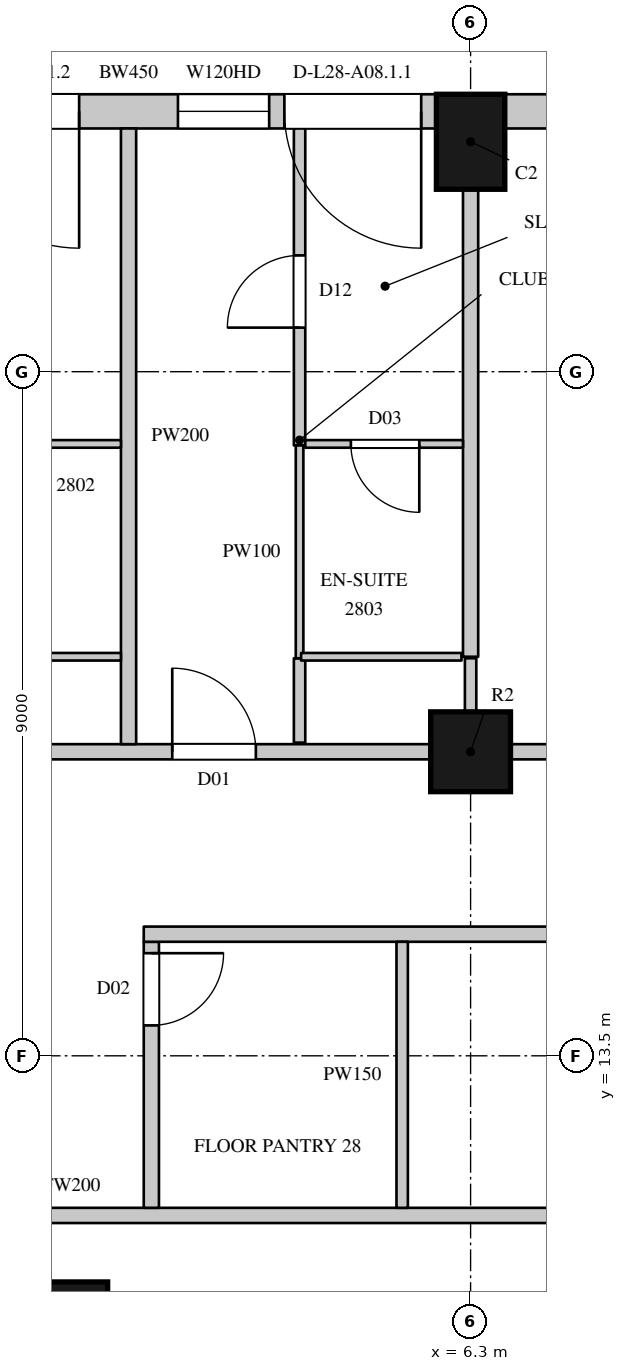
"""IFC4 building model, lengths in metres.
Left out: names, types, materials, properties, quantities, classifications, styles, units other than length and angle.
Written with IfcOpenShell. Run it as: python <this file> out.ifc"""

import sys

from ifc_helpers import new_model, si_unit, direction, frame, frame_2d, origin, origin_2d, place, context, subcontext, project, spatial, rectangle, circle, extrude, element, fill, save


model = new_model("IFC4")
c1 = context("Model", 3, precision=1e-05, world=origin(), true_north=direction((0.0, 1.0)))
c2 = subcontext(c1, "Body", "Model", "MODEL_VIEW")
j1 = project(units=[si_unit("LENGTHUNIT", "METRE"), si_unit("PLANEANGLEUNIT", "RADIAN")], contexts=[c1])
p1 = place(None, origin())
s1 = spatial("IfcSite", under=j1, at=p1, CompositionType="ELEMENT")
p2 = place(p1, origin())
s2 = spatial("IfcBuilding", under=s1, at=p2, CompositionType="ELEMENT")
p3 = place(p2, frame((0.0, 0.0, 131.1)))
s3 = spatial("IfcBuildingStorey", under=s2, at=p3, CompositionType="ELEMENT", Elevation=131.1)
p4 = place(p3, frame((6.3, 25.525, 0.0), z_axis=(0.0, 0.0, 1.0), x_axis=(-1.0, 0.0, 0.0)))
e1 = element("IfcColumn", 1, at=p4, inside=s3, PredefinedType="COLUMN", context=c2, shape_type="SweptSolid", body=[
    extrude(rectangle(XDim=0.9, YDim=1.25, at=origin_2d()), origin(), (0.0, 0.0, 1.0), 3.6),
])
for number, where, z_axis, x_axis in (
    (2, (6.3, 17.5, 0.0), (0.0, 0.0, 1.0), (1.0, 0.0, 0.0)),
    (3, (1.0, 10.0, 0.0), (0.0, 0.0, 1.0), (1.0, 0.0, 0.0)),
):
    element("IfcColumn", number, at=place(p3, frame(where, z_axis=z_axis, x_axis=x_axis)), inside=s3, PredefinedType="COLUMN", context=c2, shape_type="SweptSolid", body=[
        extrude(circle(Radius=0.525, at=origin_2d()), origin(), (0.0, 0.0, 1.0), 3.6),
    ])
p5 = place(p3, frame((11.989, 25.925, 0.0), z_axis=(0.0, 0.0, 1.0), x_axis=(-1.0, 0.0, 0.0)))
e4 = element("IfcWall", 4, at=p5, inside=s3, PredefinedType="SOLIDWALL", context=c2, shape_type="SweptSolid", body=[
    extrude(rectangle(XDim=5.239, YDim=0.45, at=frame_2d((2.619, 0.0))), origin(), (0.0, 0.0, 1.0), 3.3),
])
p6 = place(p5, frame((1.77, 0.0, 1.05)))
e5 = element("IfcOpeningElement", 5, at=p6, cuts=e4, PredefinedType="OPENING", context=c2, shape_type="SweptSolid", body=[
    extrude(rectangle(XDim=2.1, YDim=2.0, at=frame_2d((1.05, 1.0))), frame((0.0, 0.235, 0.0), z_axis=(0.0, -1.0, 0.0), x_axis=(1.0, 0.0, 0.0)), (0.0, 0.0, 1.0), 0.47),
])
p7 = place(p3, frame((5.85, 25.925, 0.0), z_axis=(0.0, 0.0, 1.0), x_axis=(-1.0, 0.0, 0.0)))
e6 = element("IfcWall", 6, at=p7, inside=s3, PredefinedType="SOLIDWALL", context=c2, shape_type="SweptSolid", body=[
    extrude(rectangle(XDim=8.1, YDim=0.45, at=frame_2d((4.05, 0.0))), origin(), (0.0, 0.0, 1.0), 3.3),
])
p8 = place(p7, frame((0.2, 0.0, 0.0)))
e7 = element("IfcOpeningElement", 7, at=p8, cuts=e6, PredefinedType="OPENING", context=c2, shape_type="SweptSolid", body=[
    extrude(rectangle(XDim=1.8, YDim=2.4, at=frame_2d((0.9, 1.2))), frame((0.0, 0.235, 0.0), z_axis=(0.0, -1.0, 0.0), x_axis=(1.0, 0.0, 0.0)), (0.0, 0.0, 1.0), 0.47),
])
p9 = place(p7, frame((2.2, 0.0, 1.05)))
e8 = element("IfcOpeningElement", 8, at=p9, cuts=e6, PredefinedType="OPENING", context=c2, shape_type="SweptSolid", body=[
    extrude(rectangle(XDim=1.2, YDim=2.0, at=frame_2d((0.6, 1.0))), frame((0.0, 0.235, 0.0), z_axis=(0.0, -1.0, 0.0), x_axis=(1.0, 0.0, 0.0)), (0.0, 0.0, 1.0), 0.47),
])
p10 = place(p7, frame((4.7, 0.0, 0.0)))
e9 = element("IfcOpeningElement", 9, at=p10, cuts=e6, PredefinedType="OPENING", context=c2, shape_type="SweptSolid", body=[
    extrude(rectangle(XDim=1.8, YDim=2.4, at=frame_2d((0.9, 1.2))), frame((0.0, 0.235, 0.0), z_axis=(0.0, -1.0, 0.0), x_axis=(1.0, 0.0, 0.0)), (0.0, 0.0, 1.0), 0.47),
])
p11 = place(p7, frame((6.7, 0.0, 1.05)))
e10 = element("IfcOpeningElement", 10, at=p11, cuts=e6, PredefinedType="OPENING", context=c2, shape_type="SweptSolid", body=[
    extrude(rectangle(XDim=1.2, YDim=2.0, at=frame_2d((0.6, 1.0))), frame((0.0, 0.235, 0.0), z_axis=(0.0, -1.0, 0.0), x_axis=(1.0, 0.0, 0.0)), (0.0, 0.0, 1.0), 0.47),
])
p12 = place(p3, frame((-2.175, 17.5, 0.0), z_axis=(0.0, 0.0, 1.0), x_axis=(1.0, 0.0, 0.0)))
e11 = element("IfcWall", 11, at=p12, inside=s3, PredefinedType="PARTITIONING", context=c2, shape_type="SweptSolid", body=[
    extrude(rectangle(XDim=7.95, YDim=0.2, at=frame_2d((3.975, 0.0))), origin(), (0.0, 0.0, 1.0), 2.75),
])
p13 = place(p12, frame((4.55, 0.0, 0.0)))
e12 = element("IfcOpeningElement", 12, at=p13, cuts=e11, PredefinedType="OPENING", context=c2, shape_type="SweptSolid", body=[
    extrude(rectangle(XDim=1.1, YDim=2.4, at=frame_2d((0.55, 1.2))), frame((0.0, 0.11, 0.0), z_axis=(0.0, -1.0, 0.0), x_axis=(1.0, 0.0, 0.0)), (0.0, 0.0, 1.0), 0.22),
])
p14 = place(p3, frame((6.825, 17.5, 0.0), z_axis=(0.0, 0.0, 1.0), x_axis=(1.0, 0.0, 0.0)))
e13 = element("IfcWall", 13, at=p14, inside=s3, PredefinedType="PARTITIONING", context=c2, shape_type="SweptSolid", body=[
    extrude(rectangle(XDim=7.95, YDim=0.2, at=frame_2d((3.975, 0.0))), origin(), (0.0, 0.0, 1.0), 2.75),
])
p15 = place(p14, frame((1.55, 0.0, 0.0)))
e14 = element("IfcOpeningElement", 14, at=p15, cuts=e13, PredefinedType="OPENING", context=c2, shape_type="SweptSolid", body=[
    extrude(rectangle(XDim=1.1, YDim=2.4, at=frame_2d((0.55, 1.2))), frame((0.0, 0.11, 0.0), z_axis=(0.0, -1.0, 0.0), x_axis=(1.0, 0.0, 0.0)), (0.0, 0.0, 1.0), 0.22),
])
p16 = place(p3, frame((-8.3, 11.4, 0.0), z_axis=(0.0, 0.0, 1.0), x_axis=(1.0, 0.0, 0.0)))
e15 = element("IfcWall", 15, at=p16, inside=s3, PredefinedType="PARTITIONING", context=c2, shape_type="SweptSolid", body=[
    extrude(rectangle(XDim=18.7, YDim=0.2, at=frame_2d((9.35, 0.0))), origin(), (0.0, 0.0, 1.0), 3.3),
])
p17 = place(p16, frame((6.9, 0.0, 0.0)))
e16 = element("IfcOpeningElement", 16, at=p17, cuts=e15, PredefinedType="OPENING", context=c2, shape_type="SweptSolid", body=[
    extrude(rectangle(XDim=1.5, YDim=2.2, at=frame_2d((0.75, 1.1))), frame((0.0, 0.11, 0.0), z_axis=(0.0, -1.0, 0.0), x_axis=(1.0, 0.0, 0.0)), (0.0, 0.0, 1.0), 0.22),
])
p18 = place(p3, frame((2.1, 11.5, 0.0), z_axis=(0.0, 0.0, 1.0), x_axis=(0.0, 1.0, 0.0)))
e17 = element("IfcWall", 17, at=p18, inside=s3, PredefinedType="PARTITIONING", context=c2, shape_type="SweptSolid", body=[
    extrude(rectangle(XDim=3.5, YDim=0.2, at=frame_2d((1.75, 0.0))), origin(), (0.0, 0.0, 1.0), 3.3),
])
p19 = place(p18, frame((2.4, 0.0, 0.0)))
e18 = element("IfcOpeningElement", 18, at=p19, cuts=e17, PredefinedType="OPENING", context=c2, shape_type="SweptSolid", body=[
    extrude(rectangle(XDim=0.95, YDim=2.2, at=frame_2d((0.475, 1.1))), frame((0.0, 0.11, 0.0), z_axis=(0.0, -1.0, 0.0), x_axis=(1.0, 0.0, 0.0)), (0.0, 0.0, 1.0), 0.22),
])
p20 = place(p3, frame((2.0, 15.1, 0.0), z_axis=(0.0, 0.0, 1.0), x_axis=(1.0, 0.0, 0.0)))
e19 = element("IfcWall", 19, at=p20, inside=s3, PredefinedType="PARTITIONING", context=c2, shape_type="SweptSolid", body=[
    extrude(rectangle(XDim=11.8, YDim=0.2, at=frame_2d((5.9, 0.0))), origin(), (0.0, 0.0, 1.0), 3.3),
])
p21 = place(p20, frame((7.1, 0.0, 0.0)))
e20 = element("IfcOpeningElement", 20, at=p21, cuts=e19, PredefinedType="OPENING", context=c2, shape_type="SweptSolid", body=[
    extrude(rectangle(XDim=0.9, YDim=2.2, at=frame_2d((0.45, 1.1))), frame((0.0, 0.11, 0.0), z_axis=(0.0, -1.0, 0.0), x_axis=(1.0, 0.0, 0.0)), (0.0, 0.0, 1.0), 0.22),
])
p22 = place(p3, frame((4.05, 17.62, 0.0), z_axis=(0.0, 0.0, 1.0), x_axis=(0.0, 1.0, 0.0)))
e21 = element("IfcWall", 21, at=p22, inside=s3, PredefinedType="PARTITIONING", context=c2, shape_type="SweptSolid", body=[
    extrude(rectangle(XDim=1.11, YDim=0.15, at=frame_2d((0.555, 0.0))), origin(), (0.0, 0.0, 1.0), 3.3),
])
p23 = place(p3, frame((4.05, 21.53, 0.0), z_axis=(0.0, 0.0, 1.0), x_axis=(0.0, 1.0, 0.0)))
e22 = element("IfcWall", 22, at=p23, inside=s3, PredefinedType="PARTITIONING", context=c2, shape_type="SweptSolid", body=[
    extrude(rectangle(XDim=4.17, YDim=0.15, at=frame_2d((2.085, 0.0))), origin(), (0.0, 0.0, 1.0), 3.3),
])
p24 = place(p23, frame((1.55, 0.0, 0.0)))
e23 = element("IfcOpeningElement", 23, at=p24, cuts=e22, PredefinedType="OPENING", context=c2, shape_type="SweptSolid", body=[
    extrude(rectangle(XDim=0.95, YDim=2.2, at=frame_2d((0.475, 1.1))), frame((0.0, 0.085, 0.0), z_axis=(0.0, -1.0, 0.0), x_axis=(1.0, 0.0, 0.0)), (0.0, 0.0, 1.0), 0.17),
])
p25 = place(p3, frame((5.4, 11.5, 0.0), z_axis=(0.0, 0.0, 1.0), x_axis=(0.0, 1.0, 0.0)))
e24 = element("IfcWall", 24, at=p25, inside=s3, PredefinedType="PARTITIONING", context=c2, shape_type="SweptSolid", body=[
    extrude(rectangle(XDim=3.5, YDim=0.15, at=frame_2d((1.75, 0.0))), origin(), (0.0, 0.0, 1.0), 3.3),
])
p26 = place(p3, frame((6.3, 18.025, 0.0), z_axis=(0.0, 0.0, 1.0), x_axis=(0.0, 1.0, 0.0)))
e25 = element("IfcWall", 25, at=p26, inside=s3, PredefinedType="PARTITIONING", context=c2, shape_type="SweptSolid", body=[
    extrude(rectangle(XDim=0.705, YDim=0.15, at=frame_2d((0.353, 0.0))), origin(), (0.0, 0.0, 1.0), 2.75),
])
p27 = place(p3, frame((1.8, 17.6, 0.0), z_axis=(0.0, 0.0, 1.0), x_axis=(0.0, 1.0, 0.0)))
e26 = element("IfcWall", 26, at=p27, inside=s3, PredefinedType="PARTITIONING", context=c2, shape_type="SweptSolid", body=[
    extrude(rectangle(XDim=8.1, YDim=0.2, at=frame_2d((4.05, 0.0))), origin(), (0.0, 0.0, 1.0), 2.65),
])
p28 = place(p3, frame((6.3, 18.75, 0.0), z_axis=(0.0, 0.0, 1.0), x_axis=(0.0, 1.0, 0.0)))
e27 = element("IfcWall", 27, at=p28, inside=s3, PredefinedType="PARTITIONING", context=c2, shape_type="SweptSolid", body=[
    extrude(rectangle(XDim=6.15, YDim=0.2, at=frame_2d((3.075, 0.0))), origin(), (0.0, 0.0, 1.0), 2.75),
])
for number, where, z_axis, x_axis in (
    (28, (-0.846, 18.75, 0.0), (0.0, 0.0, 1.0), (1.0, 0.0, 0.0)),
    (29, (-0.846, 21.55, 0.0), (0.0, 0.0, 1.0), (1.0, 0.0, 0.0)),
):
    element("IfcWall", number, at=place(p3, frame(where, z_axis=z_axis, x_axis=x_axis)), inside=s3, PredefinedType="PARTITIONING", context=c2, shape_type="SweptSolid", body=[
        extrude(rectangle(XDim=2.546, YDim=0.1, at=frame_2d((1.273, 0.0))), origin(), (0.0, 0.0, 1.0), 3.3),
    ])
p29 = place(p3, frame((4.05, 18.73, 0.0), z_axis=(0.0, 0.0, 1.0), x_axis=(0.0, 1.0, 0.0)))
e30 = element("IfcWall", 30, at=p29, inside=s3, PredefinedType="PARTITIONING", context=c2, shape_type="SweptSolid", body=[
    extrude(rectangle(XDim=2.8, YDim=0.1, at=frame_2d((1.4, 0.0))), origin(), (0.0, 0.0, 1.0), 3.3),
])
p30 = place(p3, frame((4.125, 21.55, 0.0), z_axis=(0.0, 0.0, 1.0), x_axis=(1.0, 0.0, 0.0)))
e31 = element("IfcWall", 31, at=p30, inside=s3, PredefinedType="PARTITIONING", context=c2, shape_type="SweptSolid", body=[
    extrude(rectangle(XDim=2.075, YDim=0.1, at=frame_2d((1.038, 0.0))), origin(), (0.0, 0.0, 1.0), 3.3),
])
p31 = place(p30, frame((0.6, 0.0, 0.0)))
e32 = element("IfcOpeningElement", 32, at=p31, cuts=e31, PredefinedType="OPENING", context=c2, shape_type="SweptSolid", body=[
    extrude(rectangle(XDim=0.9, YDim=2.2, at=frame_2d((0.45, 1.1))), frame((0.0, 0.06, 0.0), z_axis=(0.0, -1.0, 0.0), x_axis=(1.0, 0.0, 0.0)), (0.0, 0.0, 1.0), 0.12),
])
p32 = place(p3, frame((4.07, 18.75, 0.0), z_axis=(0.0, 0.0, 1.0), x_axis=(1.0, 0.0, 0.0)))
e33 = element("IfcWall", 33, at=p32, inside=s3, PredefinedType="PARTITIONING", context=c2, shape_type="SweptSolid", body=[
    extrude(rectangle(XDim=2.11, YDim=0.1, at=frame_2d((1.055, 0.0))), origin(), (0.0, 0.0, 1.0), 3.3),
])
p33 = place(p8, origin())
e34 = element("IfcDoor", 34, at=p33, inside=s3, OperationType="SLIDING_TO_LEFT", PredefinedType="DOOR", context=c2, shape_type="SweptSolid", body=[
    extrude(rectangle(XDim=1.8, YDim=2.4, at=frame_2d((0.9, 1.2))), frame((0.0, 0.13, 0.0), z_axis=(0.0, -1.0, 0.0), x_axis=(1.0, 0.0, 0.0)), (0.0, 0.0, 1.0), 0.05),
])
fill(e7, e34)
p34 = place(p9, origin())
e35 = element("IfcWindow", 35, at=p34, inside=s3, PartitioningType="SINGLE_PANEL", PredefinedType="WINDOW", context=c2, shape_type="SweptSolid", body=[
    extrude(rectangle(XDim=1.2, YDim=2.0, at=frame_2d((0.6, 1.0))), frame((0.0, 0.135, 0.0), z_axis=(0.0, -1.0, 0.0), x_axis=(1.0, 0.0, 0.0)), (0.0, 0.0, 1.0), 0.06),
])
fill(e8, e35)
p35 = place(p10, origin())
e36 = element("IfcDoor", 36, at=p35, inside=s3, OperationType="SLIDING_TO_LEFT", PredefinedType="DOOR", context=c2, shape_type="SweptSolid", body=[
    extrude(rectangle(XDim=1.8, YDim=2.4, at=frame_2d((0.9, 1.2))), frame((0.0, 0.13, 0.0), z_axis=(0.0, -1.0, 0.0), x_axis=(1.0, 0.0, 0.0)), (0.0, 0.0, 1.0), 0.05),
])
fill(e9, e36)
p36 = place(p19, origin())
e37 = element("IfcDoor", 37, at=p36, inside=s3, OperationType="SINGLE_SWING_LEFT", PredefinedType="DOOR", context=c2, shape_type="SweptSolid", body=[
    extrude(rectangle(XDim=0.95, YDim=2.2, at=frame_2d((0.475, 1.1))), frame((0.0, 0.025, 0.0), z_axis=(0.0, -1.0, 0.0), x_axis=(1.0, 0.0, 0.0)), (0.0, 0.0, 1.0), 0.05),
])
fill(e18, e37)
p37 = place(p13, origin())
e38 = element("IfcDoor", 38, at=p37, inside=s3, OperationType="SINGLE_SWING_LEFT", PredefinedType="DOOR", context=c2, shape_type="SweptSolid", body=[
    extrude(rectangle(XDim=1.1, YDim=2.4, at=frame_2d((0.55, 1.2))), frame((0.0, 0.025, 0.0), z_axis=(0.0, -1.0, 0.0), x_axis=(1.0, 0.0, 0.0)), (0.0, 0.0, 1.0), 0.05),
])
fill(e12, e38)
p38 = place(p24, origin())
e39 = element("IfcDoor", 39, at=p38, inside=s3, OperationType="SINGLE_SWING_LEFT", PredefinedType="DOOR", context=c2, shape_type="SweptSolid", body=[
    extrude(rectangle(XDim=0.95, YDim=2.2, at=frame_2d((0.475, 1.1))), frame((0.0, 0.025, 0.0), z_axis=(0.0, -1.0, 0.0), x_axis=(1.0, 0.0, 0.0)), (0.0, 0.0, 1.0), 0.05),
])
fill(e23, e39)
p39 = place(p31, origin())
e40 = element("IfcDoor", 40, at=p39, inside=s3, OperationType="SINGLE_SWING_LEFT", PredefinedType="DOOR", context=c2, shape_type="SweptSolid", body=[
    extrude(rectangle(XDim=0.9, YDim=2.2, at=frame_2d((0.45, 1.1))), frame((0.0, 0.025, 0.0), z_axis=(0.0, -1.0, 0.0), x_axis=(1.0, 0.0, 0.0)), (0.0, 0.0, 1.0), 0.05),
])
fill(e32, e40)
save(model, sys.argv[1])
